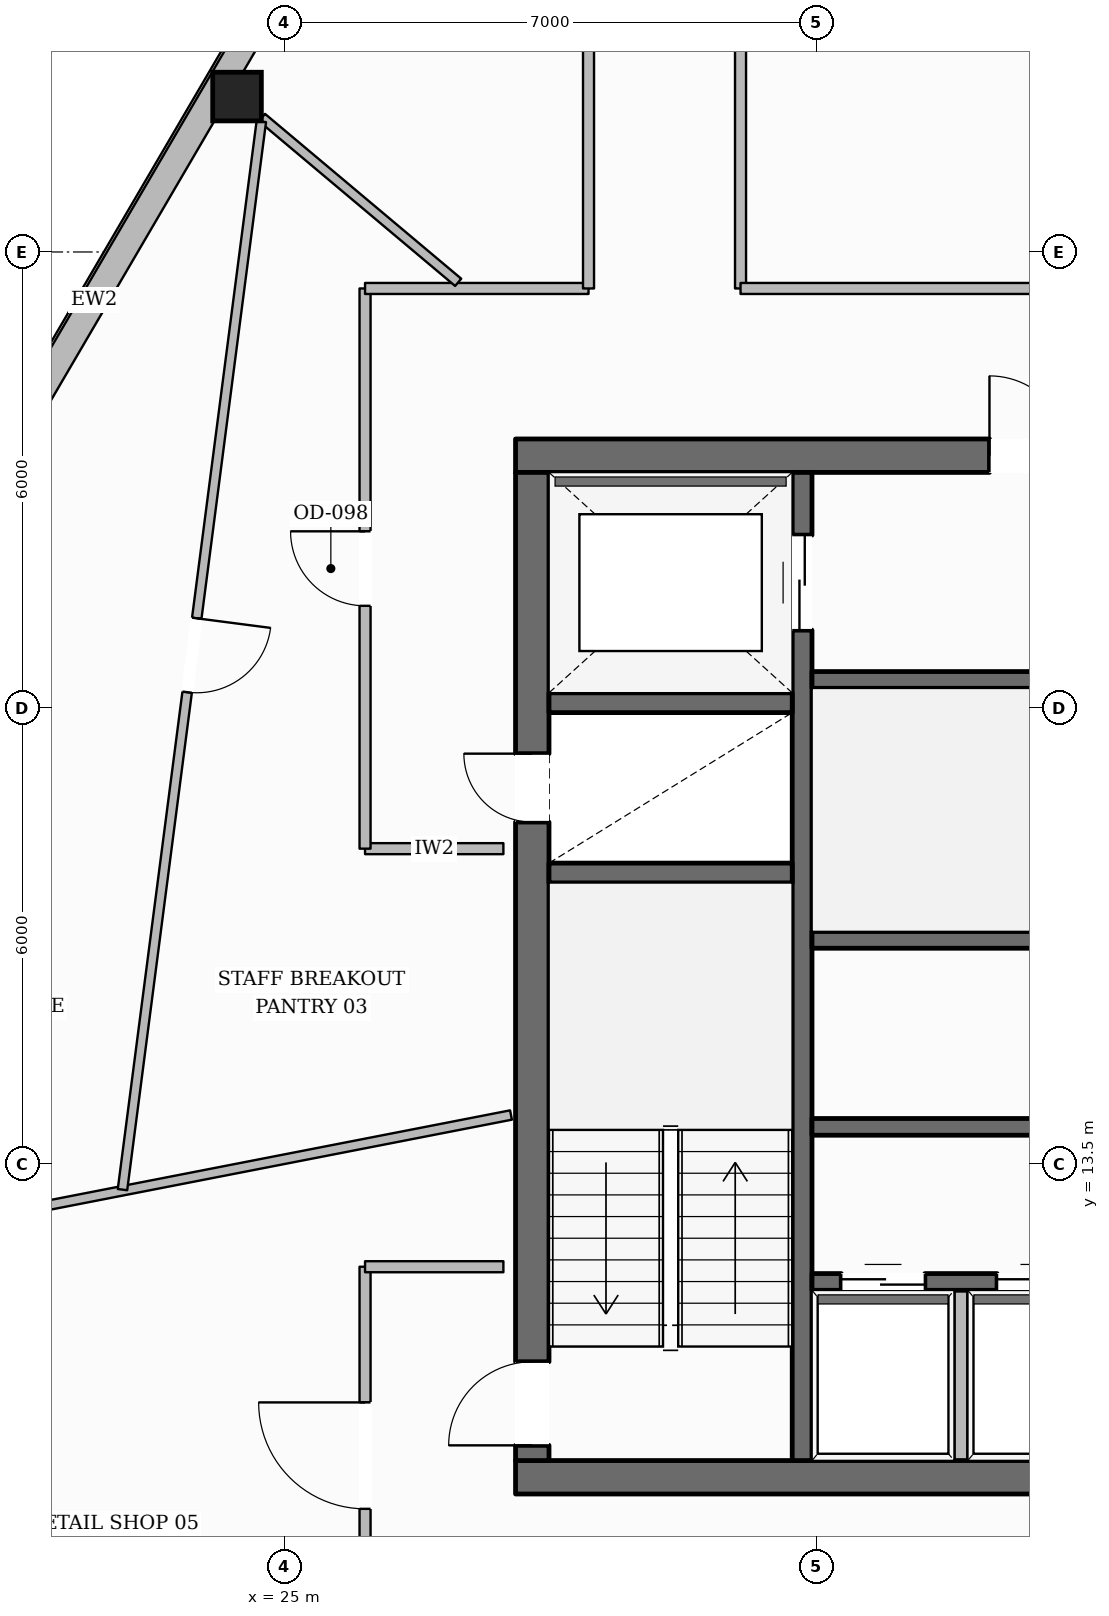
"""IFC4 building model, lengths in metres.
Left out: names, types, materials, properties, quantities, classifications, styles, units other than length and angle.
Written with IfcOpenShell. Run it as: python <this file> out.ifc"""

import sys

from ifc_helpers import new_model, si_unit, direction, frame, frame_2d, origin, origin_2d, place, context, subcontext, project, spatial, rectangle, hollow_rectangle, extrude, element, fill, save


model = new_model("IFC4")
c1 = context("Model", 3, precision=1e-05, world=origin(), true_north=direction((0.0, 1.0)))
c2 = subcontext(c1, "Body", "Model", "MODEL_VIEW")
j1 = project(units=[si_unit("LENGTHUNIT", "METRE"), si_unit("PLANEANGLEUNIT", "RADIAN")], contexts=[c1])
p1 = place(None, origin())
s1 = spatial("IfcSite", under=j1, at=p1, CompositionType="ELEMENT")
p2 = place(p1, origin())
s2 = spatial("IfcBuilding", under=s1, at=p2, CompositionType="ELEMENT")
p3 = place(p2, frame((0.0, 0.0, 199.65)))
s3 = spatial("IfcBuildingStorey", under=s2, at=p3, CompositionType="ELEMENT", Elevation=199.65)
p4 = place(p3, frame((28.04, 9.38, 0.0), z_axis=(0.0, 0.0, 1.0), x_axis=(1.0, 0.0, 0.0)))
e1 = element("IfcWall", 1, at=p4, inside=s3, PredefinedType="SOLIDWALL", context=c2, shape_type="SweptSolid", body=[
    extrude(rectangle(XDim=19.92, YDim=0.44, at=frame_2d((9.96, 0.0))), origin(), (0.0, 0.0, 1.0), 3.6),
])
p5 = place(p4, frame((10.46, 0.0, 0.0)))
e2 = element("IfcOpeningElement", 2, at=p5, cuts=e1, PredefinedType="OPENING", context=c2, shape_type="SweptSolid", body=[
    extrude(rectangle(XDim=1.4, YDim=2.2, at=frame_2d((0.7, 1.1))), frame((0.0, 0.23, 0.0), z_axis=(0.0, -1.0, 0.0), x_axis=(1.0, 0.0, 0.0)), (0.0, 0.0, 1.0), 0.46),
])
p6 = place(p3, frame((28.04, 22.82, 0.0), z_axis=(0.0, 0.0, 1.0), x_axis=(1.0, 0.0, 0.0)))
e3 = element("IfcWall", 3, at=p6, inside=s3, PredefinedType="SOLIDWALL", context=c2, shape_type="SweptSolid", body=[
    extrude(rectangle(XDim=19.92, YDim=0.44, at=frame_2d((9.96, 0.0))), origin(), (0.0, 0.0, 1.0), 3.6),
])
p7 = place(p6, frame((6.235, 0.0, 0.0)))
e4 = element("IfcOpeningElement", 4, at=p7, cuts=e3, PredefinedType="OPENING", context=c2, shape_type="SweptSolid", body=[
    extrude(rectangle(XDim=1.05, YDim=2.15, at=frame_2d((0.525, 1.075))), frame((0.0, 0.23, 0.0), z_axis=(0.0, -1.0, 0.0), x_axis=(1.0, 0.0, 0.0)), (0.0, 0.0, 1.0), 0.46),
])
p8 = place(p6, frame((12.635, 0.0, 0.0)))
e5 = element("IfcOpeningElement", 5, at=p8, cuts=e3, PredefinedType="OPENING", context=c2, shape_type="SweptSolid", body=[
    extrude(rectangle(XDim=1.05, YDim=2.15, at=frame_2d((0.525, 1.075))), frame((0.0, 0.23, 0.0), z_axis=(0.0, -1.0, 0.0), x_axis=(1.0, 0.0, 0.0)), (0.0, 0.0, 1.0), 0.46),
])
p9 = place(p3, frame((28.26, 9.6, 0.0), z_axis=(0.0, 0.0, 1.0), x_axis=(0.0, 1.0, 0.0)))
e6 = element("IfcWall", 6, at=p9, inside=s3, PredefinedType="SOLIDWALL", context=c2, shape_type="SweptSolid", body=[
    extrude(rectangle(XDim=13.0, YDim=0.44, at=frame_2d((6.5, 0.0))), origin(), (0.0, 0.0, 1.0), 3.6),
])
p10 = place(p9, frame((0.2, 0.0, 0.0)))
e7 = element("IfcOpeningElement", 7, at=p10, cuts=e6, PredefinedType="OPENING", context=c2, shape_type="SweptSolid", body=[
    extrude(rectangle(XDim=1.1, YDim=2.15, at=frame_2d((0.55, 1.075))), frame((0.0, 0.23, 0.0), z_axis=(0.0, -1.0, 0.0), x_axis=(1.0, 0.0, 0.0)), (0.0, 0.0, 1.0), 0.46),
])
p11 = place(p9, frame((8.4, 0.0, 0.0)))
e8 = element("IfcOpeningElement", 8, at=p11, cuts=e6, PredefinedType="OPENING", context=c2, shape_type="SweptSolid", body=[
    extrude(rectangle(XDim=0.9, YDim=2.1, at=frame_2d((0.45, 1.05))), frame((0.0, 0.23, 0.0), z_axis=(0.0, -1.0, 0.0), x_axis=(1.0, 0.0, 0.0)), (0.0, 0.0, 1.0), 0.46),
])
p12 = place(p3, frame((31.81, 9.6, 0.0), z_axis=(0.0, 0.0, 1.0), x_axis=(0.0, 1.0, 0.0)))
e9 = element("IfcWall", 9, at=p12, inside=s3, PredefinedType="SHEAR", context=c2, shape_type="SweptSolid", body=[
    extrude(rectangle(XDim=13.0, YDim=0.26, at=frame_2d((6.5, 0.0))), origin(), (0.0, 0.0, 1.0), 3.6),
])
p13 = place(p12, frame((10.925, 0.0, 0.0)))
e10 = element("IfcOpeningElement", 10, at=p13, cuts=e9, PredefinedType="OPENING", context=c2, shape_type="SweptSolid", body=[
    extrude(rectangle(XDim=1.25, YDim=2.25, at=frame_2d((0.625, 1.125))), frame((0.0, 0.14, 0.0), z_axis=(0.0, -1.0, 0.0), x_axis=(1.0, 0.0, 0.0)), (0.0, 0.0, 1.0), 0.28),
])
for number, where, z_axis, x_axis in (
    (11, (28.48, 17.33, 0.0), (0.0, 0.0, 1.0), (1.0, 0.0, 0.0)),
    (12, (28.48, 19.57, 0.0), (0.0, 0.0, 1.0), (1.0, 0.0, 0.0)),
):
    element("IfcWall", number, at=place(p3, frame(where, z_axis=z_axis, x_axis=x_axis)), inside=s3, PredefinedType="SHEAR", context=c2, shape_type="SweptSolid", body=[
        extrude(rectangle(XDim=3.2, YDim=0.26, at=frame_2d((1.6, 0.0))), origin(), (0.0, 0.0, 1.0), 3.6),
    ])
p14 = place(p3, frame((31.94, 19.87, 0.0), z_axis=(0.0, 0.0, 1.0), x_axis=(1.0, 0.0, 0.0)))
e13 = element("IfcWall", 13, at=p14, inside=s3, PredefinedType="SOLIDWALL", context=c2, shape_type="SweptSolid", body=[
    extrude(rectangle(XDim=12.12, YDim=0.22, at=frame_2d((6.06, 0.0))), origin(), (0.0, 0.0, 1.0), 3.6),
])
p15 = place(p14, frame((6.3, 0.0, 0.0)))
e14 = element("IfcOpeningElement", 14, at=p15, cuts=e13, PredefinedType="OPENING", context=c2, shape_type="SweptSolid", body=[
    extrude(rectangle(XDim=1.1, YDim=2.15, at=frame_2d((0.55, 1.075))), frame((0.0, 0.12, 0.0), z_axis=(0.0, -1.0, 0.0), x_axis=(1.0, 0.0, 0.0)), (0.0, 0.0, 1.0), 0.24),
])
p16 = place(p14, frame((8.61, 0.0, 0.0)))
e15 = element("IfcOpeningElement", 15, at=p16, cuts=e13, PredefinedType="OPENING", context=c2, shape_type="SweptSolid", body=[
    extrude(rectangle(XDim=0.9, YDim=2.1, at=frame_2d((0.45, 1.05))), frame((0.0, 0.12, 0.0), z_axis=(0.0, -1.0, 0.0), x_axis=(1.0, 0.0, 0.0)), (0.0, 0.0, 1.0), 0.24),
])
p17 = place(p14, frame((10.85, 0.0, 0.0)))
e16 = element("IfcOpeningElement", 16, at=p17, cuts=e13, PredefinedType="OPENING", context=c2, shape_type="SweptSolid", body=[
    extrude(rectangle(XDim=0.9, YDim=2.1, at=frame_2d((0.45, 1.05))), frame((0.0, 0.12, 0.0), z_axis=(0.0, -1.0, 0.0), x_axis=(1.0, 0.0, 0.0)), (0.0, 0.0, 1.0), 0.24),
])
p18 = place(p3, frame((31.94, 16.45, 0.0), z_axis=(0.0, 0.0, 1.0), x_axis=(1.0, 0.0, 0.0)))
e17 = element("IfcWall", 17, at=p18, inside=s3, PredefinedType="SOLIDWALL", context=c2, shape_type="SweptSolid", body=[
    extrude(rectangle(XDim=12.12, YDim=0.22, at=frame_2d((6.06, 0.0))), origin(), (0.0, 0.0, 1.0), 3.6),
])
p19 = place(p3, frame((31.94, 13.99, 0.0), z_axis=(0.0, 0.0, 1.0), x_axis=(1.0, 0.0, 0.0)))
e18 = element("IfcWall", 18, at=p19, inside=s3, PredefinedType="SOLIDWALL", context=c2, shape_type="SweptSolid", body=[
    extrude(rectangle(XDim=12.12, YDim=0.22, at=frame_2d((6.06, 0.0))), origin(), (0.0, 0.0, 1.0), 3.6),
])
p20 = place(p19, frame((3.11, 0.0, 0.0)))
e19 = element("IfcOpeningElement", 19, at=p20, cuts=e18, PredefinedType="OPENING", context=c2, shape_type="SweptSolid", body=[
    extrude(rectangle(XDim=0.9, YDim=2.1, at=frame_2d((0.45, 1.05))), frame((0.0, 0.12, 0.0), z_axis=(0.0, -1.0, 0.0), x_axis=(1.0, 0.0, 0.0)), (0.0, 0.0, 1.0), 0.24),
])
p21 = place(p19, frame((9.21, 0.0, 0.0)))
e20 = element("IfcOpeningElement", 20, at=p21, cuts=e18, PredefinedType="OPENING", context=c2, shape_type="SweptSolid", body=[
    extrude(rectangle(XDim=0.9, YDim=2.1, at=frame_2d((0.45, 1.05))), frame((0.0, 0.12, 0.0), z_axis=(0.0, -1.0, 0.0), x_axis=(1.0, 0.0, 0.0)), (0.0, 0.0, 1.0), 0.24),
])
p22 = place(p3, frame((31.94, 11.95, 0.0), z_axis=(0.0, 0.0, 1.0), x_axis=(1.0, 0.0, 0.0)))
e21 = element("IfcWall", 21, at=p22, inside=s3, PredefinedType="SOLIDWALL", context=c2, shape_type="SweptSolid", body=[
    extrude(rectangle(XDim=6.19, YDim=0.22, at=frame_2d((3.095, 0.0))), origin(), (0.0, 0.0, 1.0), 3.6),
])
p23 = place(p22, frame((0.385, 0.0, 0.0)))
e22 = element("IfcOpeningElement", 22, at=p23, cuts=e21, PredefinedType="OPENING", context=c2, shape_type="SweptSolid", body=[
    extrude(rectangle(XDim=1.1, YDim=2.2, at=frame_2d((0.55, 1.1))), frame((0.0, 0.12, 0.0), z_axis=(0.0, -1.0, 0.0), x_axis=(1.0, 0.0, 0.0)), (0.0, 0.0, 1.0), 0.24),
])
p24 = place(p22, frame((2.435, 0.0, 0.0)))
e23 = element("IfcOpeningElement", 23, at=p24, cuts=e21, PredefinedType="OPENING", context=c2, shape_type="SweptSolid", body=[
    extrude(rectangle(XDim=1.1, YDim=2.2, at=frame_2d((0.55, 1.1))), frame((0.0, 0.12, 0.0), z_axis=(0.0, -1.0, 0.0), x_axis=(1.0, 0.0, 0.0)), (0.0, 0.0, 1.0), 0.24),
])
p25 = place(p22, frame((4.485, 0.0, 0.0)))
e24 = element("IfcOpeningElement", 24, at=p25, cuts=e21, PredefinedType="OPENING", context=c2, shape_type="SweptSolid", body=[
    extrude(rectangle(XDim=1.1, YDim=2.2, at=frame_2d((0.55, 1.1))), frame((0.0, 0.12, 0.0), z_axis=(0.0, -1.0, 0.0), x_axis=(1.0, 0.0, 0.0)), (0.0, 0.0, 1.0), 0.24),
])
p26 = place(p3, frame((24.376, 27.544, 0.0), z_axis=(0.0, 0.0, 1.0), x_axis=(1.0, 0.0, 0.0)))
e25 = element("IfcColumn", 25, at=p26, inside=s3, PredefinedType="COLUMN", context=c2, shape_type="SweptSolid", body=[
    extrude(hollow_rectangle(XDim=0.64, YDim=0.64, WallThickness=0.028, at=origin_2d()), origin(), (0.0, 0.0, 1.0), 3.6),
])
p27 = place(p3, frame((14.586, 11.347, 0.0), z_axis=(0.0, 0.0, 1.0), x_axis=(0.504997770855, 0.863120647089, 0.0)))
e26 = element("IfcWall", 26, at=p27, inside=s3, PredefinedType="STANDARD", context=c2, shape_type="SweptSolid", body=[
    extrude(rectangle(XDim=37.843, YDim=0.35, at=frame_2d((18.921, 0.0))), origin(), (0.0, 0.0, 1.0), 3.132),
])
p28 = place(p27, frame((9.061, 0.0, 0.0)))
e27 = element("IfcOpeningElement", 27, at=p28, cuts=e26, PredefinedType="OPENING", context=c2, shape_type="SweptSolid", body=[
    extrude(rectangle(XDim=1.0, YDim=2.2, at=frame_2d((0.5, 1.1))), frame((0.0, 0.185, 0.0), z_axis=(0.0, -1.0, 0.0), x_axis=(1.0, 0.0, 0.0)), (0.0, 0.0, 1.0), 0.37),
])
p29 = place(p27, frame((33.567, 0.0, 0.65)))
e28 = element("IfcOpeningElement", 28, at=p29, cuts=e26, PredefinedType="OPENING", context=c2, shape_type="SweptSolid", body=[
    extrude(rectangle(XDim=1.45, YDim=1.75, at=frame_2d((0.725, 0.875))), frame((0.0, 0.185, 0.0), z_axis=(0.0, -1.0, 0.0), x_axis=(1.0, 0.0, 0.0)), (0.0, 0.0, 1.0), 0.37),
])
p30 = place(p27, frame((27.42, 0.0, 0.65)))
e29 = element("IfcOpeningElement", 29, at=p30, cuts=e26, PredefinedType="OPENING", context=c2, shape_type="SweptSolid", body=[
    extrude(rectangle(XDim=1.45, YDim=1.75, at=frame_2d((0.725, 0.875))), frame((0.0, 0.185, 0.0), z_axis=(0.0, -1.0, 0.0), x_axis=(1.0, 0.0, 0.0)), (0.0, 0.0, 1.0), 0.37),
])
p31 = place(p27, frame((21.273, 0.0, 0.65)))
e30 = element("IfcOpeningElement", 30, at=p31, cuts=e26, PredefinedType="OPENING", context=c2, shape_type="SweptSolid", body=[
    extrude(rectangle(XDim=1.45, YDim=1.75, at=frame_2d((0.725, 0.875))), frame((0.0, 0.185, 0.0), z_axis=(0.0, -1.0, 0.0), x_axis=(1.0, 0.0, 0.0)), (0.0, 0.0, 1.0), 0.37),
])
p32 = place(p27, frame((2.831, 0.0, 0.65)))
e31 = element("IfcOpeningElement", 31, at=p32, cuts=e26, PredefinedType="OPENING", context=c2, shape_type="SweptSolid", body=[
    extrude(rectangle(XDim=1.45, YDim=1.75, at=frame_2d((0.725, 0.875))), frame((0.0, 0.185, 0.0), z_axis=(0.0, -1.0, 0.0), x_axis=(1.0, 0.0, 0.0)), (0.0, 0.0, 1.0), 0.37),
])
p33 = place(p3, frame((33.9, 9.52, 0.0), z_axis=(0.0, 0.0, 1.0), x_axis=(0.0, 1.0, 0.0)))
e32 = element("IfcWall", 32, at=p33, inside=s3, PredefinedType="PARTITIONING", context=c2, shape_type="SweptSolid", body=[
    extrude(rectangle(XDim=2.32, YDim=0.165, at=frame_2d((1.16, 0.0))), origin(), (0.0, 0.0, 1.0), 3.6),
])
p34 = place(p3, frame((27.88, 17.65, 0.0), z_axis=(0.0, 0.0, 1.0), x_axis=(-1.0, 0.0, 0.0)))
e33 = element("IfcWall", 33, at=p34, inside=s3, PredefinedType="PARTITIONING", context=c2, shape_type="SweptSolid", body=[
    extrude(rectangle(XDim=1.82, YDim=0.145, at=frame_2d((0.91, 0.0))), origin(), (0.0, 0.0, 1.0), 3.6),
])
p35 = place(p3, frame((26.06, 17.65, 0.0), z_axis=(0.0, 0.0, 1.0), x_axis=(0.0, 1.0, 0.0)))
e34 = element("IfcWall", 34, at=p35, inside=s3, PredefinedType="PARTITIONING", context=c2, shape_type="SweptSolid", body=[
    extrude(rectangle(XDim=7.37, YDim=0.145, at=frame_2d((3.685, 0.0))), origin(), (0.0, 0.0, 1.0), 3.339),
])
p36 = place(p35, frame((3.195, 0.0, 0.0)))
e35 = element("IfcOpeningElement", 35, at=p36, cuts=e34, PredefinedType="OPENING", context=c2, shape_type="SweptSolid", body=[
    extrude(rectangle(XDim=0.98, YDim=2.15, at=frame_2d((0.49, 1.075))), frame((0.0, 0.083, 0.0), z_axis=(0.0, -1.0, 0.0), x_axis=(1.0, 0.0, 0.0)), (0.0, 0.0, 1.0), 0.165),
])
p37 = place(p3, frame((26.06, 25.02, 0.0), z_axis=(0.0, 0.0, 1.0), x_axis=(1.0, 0.0, 0.0)))
e36 = element("IfcWall", 36, at=p37, inside=s3, PredefinedType="PARTITIONING", context=c2, shape_type="SweptSolid", body=[
    extrude(rectangle(XDim=2.94, YDim=0.145, at=frame_2d((1.47, 0.0))), origin(), (0.0, 0.0, 1.0), 3.6),
])
for number, where, z_axis, x_axis in (
    (37, (29.0, 25.02, 0.0), (0.0, 0.0, 1.0), (0.0, 1.0, 0.0)),
    (38, (31.0, 33.342, 0.0), (0.0, 0.0, 1.0), (0.0, -1.0, 0.0)),
):
    element("IfcWall", number, at=place(p3, frame(where, z_axis=z_axis, x_axis=x_axis)), inside=s3, PredefinedType="PARTITIONING", context=c2, shape_type="SweptSolid", body=[
        extrude(rectangle(XDim=8.322, YDim=0.145, at=frame_2d((4.161, 0.0))), origin(), (0.0, 0.0, 1.0), 3.6),
    ])
p38 = place(p3, frame((31.0, 25.02, 0.0), z_axis=(0.0, 0.0, 1.0), x_axis=(1.0, 0.0, 0.0)))
e39 = element("IfcWall", 39, at=p38, inside=s3, PredefinedType="PARTITIONING", context=c2, shape_type="SweptSolid", body=[
    extrude(rectangle(XDim=14.0, YDim=0.145, at=frame_2d((7.0, 0.0))), origin(), (0.0, 0.0, 1.0), 3.6),
])
p39 = place(p38, frame((4.42, 0.0, 0.0)))
e40 = element("IfcOpeningElement", 40, at=p39, cuts=e39, PredefinedType="OPENING", context=c2, shape_type="SweptSolid", body=[
    extrude(rectangle(XDim=1.4, YDim=2.2, at=frame_2d((0.7, 1.1))), frame((0.0, 0.083, 0.0), z_axis=(0.0, -1.0, 0.0), x_axis=(1.0, 0.0, 0.0)), (0.0, 0.0, 1.0), 0.165),
])
p40 = place(p3, frame((26.06, 7.18, 0.0), z_axis=(0.0, 0.0, 1.0), x_axis=(0.0, 1.0, 0.0)))
e41 = element("IfcWall", 41, at=p40, inside=s3, PredefinedType="PARTITIONING", context=c2, shape_type="SweptSolid", body=[
    extrude(rectangle(XDim=4.97, YDim=0.145, at=frame_2d((2.485, 0.0))), origin(), (0.0, 0.0, 1.0), 3.6),
])
p41 = place(p40, frame((1.785, 0.0, 0.0)))
e42 = element("IfcOpeningElement", 42, at=p41, cuts=e41, PredefinedType="OPENING", context=c2, shape_type="SweptSolid", body=[
    extrude(rectangle(XDim=1.4, YDim=2.2, at=frame_2d((0.7, 1.1))), frame((0.0, 0.083, 0.0), z_axis=(0.0, -1.0, 0.0), x_axis=(1.0, 0.0, 0.0)), (0.0, 0.0, 1.0), 0.165),
])
p42 = place(p3, frame((26.06, 12.15, 0.0), z_axis=(0.0, 0.0, 1.0), x_axis=(1.0, 0.0, 0.0)))
e43 = element("IfcWall", 43, at=p42, inside=s3, PredefinedType="PARTITIONING", context=c2, shape_type="SweptSolid", body=[
    extrude(rectangle(XDim=1.82, YDim=0.145, at=frame_2d((0.91, 0.0))), origin(), (0.0, 0.0, 1.0), 3.6),
])
p43 = place(p3, frame((27.285, 25.101, 0.0), z_axis=(0.0, 0.0, 1.0), x_axis=(-0.765710570965, 0.643185293296, 0.0)))
e44 = element("IfcWall", 44, at=p43, inside=s3, PredefinedType="PARTITIONING", context=c2, shape_type="SweptSolid", body=[
    extrude(rectangle(XDim=3.371, YDim=0.125, at=frame_2d((1.686, 0.0))), origin(), (0.0, 0.0, 1.0), 3.141),
])
p44 = place(p3, frame((27.98, 14.146, 0.0), z_axis=(0.0, 0.0, 1.0), x_axis=(-0.981510799249, -0.191406768317, 0.0)))
e45 = element("IfcWall", 45, at=p44, inside=s3, PredefinedType="PARTITIONING", context=c2, shape_type="SweptSolid", body=[
    extrude(rectangle(XDim=12.847, YDim=0.125, at=frame_2d((6.423, 0.0))), origin(), (0.0, 0.0, 1.0), 3.141),
])
p45 = place(p3, frame((24.695, 27.217, 0.0), z_axis=(0.0, 0.0, 1.0), x_axis=(-0.128889138704, -0.991659008896, 0.0)))
e46 = element("IfcWall", 46, at=p45, inside=s3, PredefinedType="PARTITIONING", context=c2, shape_type="SweptSolid", body=[
    extrude(rectangle(XDim=14.17, YDim=0.125, at=frame_2d((7.085, 0.0))), origin(), (0.0, 0.0, 1.0), 3.339),
])
p46 = place(p45, frame((6.591, 0.0, 0.0)))
e47 = element("IfcOpeningElement", 47, at=p46, cuts=e46, PredefinedType="OPENING", context=c2, shape_type="SweptSolid", body=[
    extrude(rectangle(XDim=0.98, YDim=2.15, at=frame_2d((0.49, 1.075))), frame((0.0, 0.073, 0.0), z_axis=(0.0, -1.0, 0.0), x_axis=(1.0, 0.0, 0.0)), (0.0, 0.0, 1.0), 0.145),
])
p47 = place(p10, origin())
e48 = element("IfcDoor", 48, at=p47, inside=s3, OperationType="SINGLE_SWING_LEFT", PredefinedType="DOOR", context=c2, shape_type="SweptSolid", body=[
    extrude(rectangle(XDim=1.1, YDim=2.15, at=frame_2d((0.55, 1.075))), frame((0.0, 0.025, 0.0), z_axis=(0.0, -1.0, 0.0), x_axis=(1.0, 0.0, 0.0)), (0.0, 0.0, 1.0), 0.05),
])
fill(e7, e48)
p48 = place(p11, origin())
e49 = element("IfcDoor", 49, at=p48, inside=s3, OperationType="SINGLE_SWING_RIGHT", PredefinedType="DOOR", context=c2, shape_type="SweptSolid", body=[
    extrude(rectangle(XDim=0.9, YDim=2.1, at=frame_2d((0.45, 1.05))), frame((0.0, 0.025, 0.0), z_axis=(0.0, -1.0, 0.0), x_axis=(1.0, 0.0, 0.0)), (0.0, 0.0, 1.0), 0.05),
])
fill(e8, e49)
p49 = place(p7, origin())
e50 = element("IfcDoor", 50, at=p49, inside=s3, OperationType="SINGLE_SWING_LEFT", PredefinedType="DOOR", context=c2, shape_type="SweptSolid", body=[
    extrude(rectangle(XDim=1.05, YDim=2.15, at=frame_2d((0.525, 1.075))), frame((0.0, 0.025, 0.0), z_axis=(0.0, -1.0, 0.0), x_axis=(1.0, 0.0, 0.0)), (0.0, 0.0, 1.0), 0.05),
])
fill(e4, e50)
p50 = place(p13, origin())
e51 = element("IfcDoor", 51, at=p50, inside=s3, OperationType="DOUBLE_DOOR_SLIDING", PredefinedType="DOOR", context=c2, shape_type="SweptSolid", body=[
    extrude(rectangle(XDim=1.25, YDim=2.25, at=frame_2d((0.625, 1.125))), frame((0.0, 0.025, 0.0), z_axis=(0.0, -1.0, 0.0), x_axis=(1.0, 0.0, 0.0)), (0.0, 0.0, 1.0), 0.05),
])
fill(e10, e51)
p51 = place(p23, origin())
e52 = element("IfcDoor", 52, at=p51, inside=s3, OperationType="DOUBLE_DOOR_SLIDING", PredefinedType="DOOR", context=c2, shape_type="SweptSolid", body=[
    extrude(rectangle(XDim=1.1, YDim=2.2, at=frame_2d((0.55, 1.1))), frame((0.0, 0.025, 0.0), z_axis=(0.0, -1.0, 0.0), x_axis=(1.0, 0.0, 0.0)), (0.0, 0.0, 1.0), 0.05),
])
fill(e22, e52)
p52 = place(p24, origin())
e53 = element("IfcDoor", 53, at=p52, inside=s3, OperationType="DOUBLE_DOOR_SLIDING", PredefinedType="DOOR", context=c2, shape_type="SweptSolid", body=[
    extrude(rectangle(XDim=1.1, YDim=2.2, at=frame_2d((0.55, 1.1))), frame((0.0, 0.025, 0.0), z_axis=(0.0, -1.0, 0.0), x_axis=(1.0, 0.0, 0.0)), (0.0, 0.0, 1.0), 0.05),
])
fill(e23, e53)
p53 = place(p36, origin())
e54 = element("IfcDoor", 54, at=p53, inside=s3, OperationType="SINGLE_SWING_RIGHT", PredefinedType="DOOR", context=c2, shape_type="SweptSolid", body=[
    extrude(rectangle(XDim=0.98, YDim=2.15, at=frame_2d((0.49, 1.075))), frame((0.0, 0.025, 0.0), z_axis=(0.0, -1.0, 0.0), x_axis=(1.0, 0.0, 0.0)), (0.0, 0.0, 1.0), 0.05),
])
fill(e35, e54)
p54 = place(p46, origin())
e55 = element("IfcDoor", 55, at=p54, inside=s3, OperationType="SINGLE_SWING_LEFT", PredefinedType="DOOR", context=c2, shape_type="SweptSolid", body=[
    extrude(rectangle(XDim=0.98, YDim=2.15, at=frame_2d((0.49, 1.075))), frame((0.0, 0.025, 0.0), z_axis=(0.0, -1.0, 0.0), x_axis=(1.0, 0.0, 0.0)), (0.0, 0.0, 1.0), 0.05),
])
fill(e47, e55)
p55 = place(p41, origin())
e56 = element("IfcDoor", 56, at=p55, inside=s3, OperationType="SINGLE_SWING_RIGHT", PredefinedType="DOOR", context=c2, shape_type="SweptSolid", body=[
    extrude(rectangle(XDim=1.4, YDim=2.2, at=frame_2d((0.7, 1.1))), frame((0.0, 0.025, 0.0), z_axis=(0.0, -1.0, 0.0), x_axis=(1.0, 0.0, 0.0)), (0.0, 0.0, 1.0), 0.05),
])
fill(e42, e56)
save(model, sys.argv[1])
